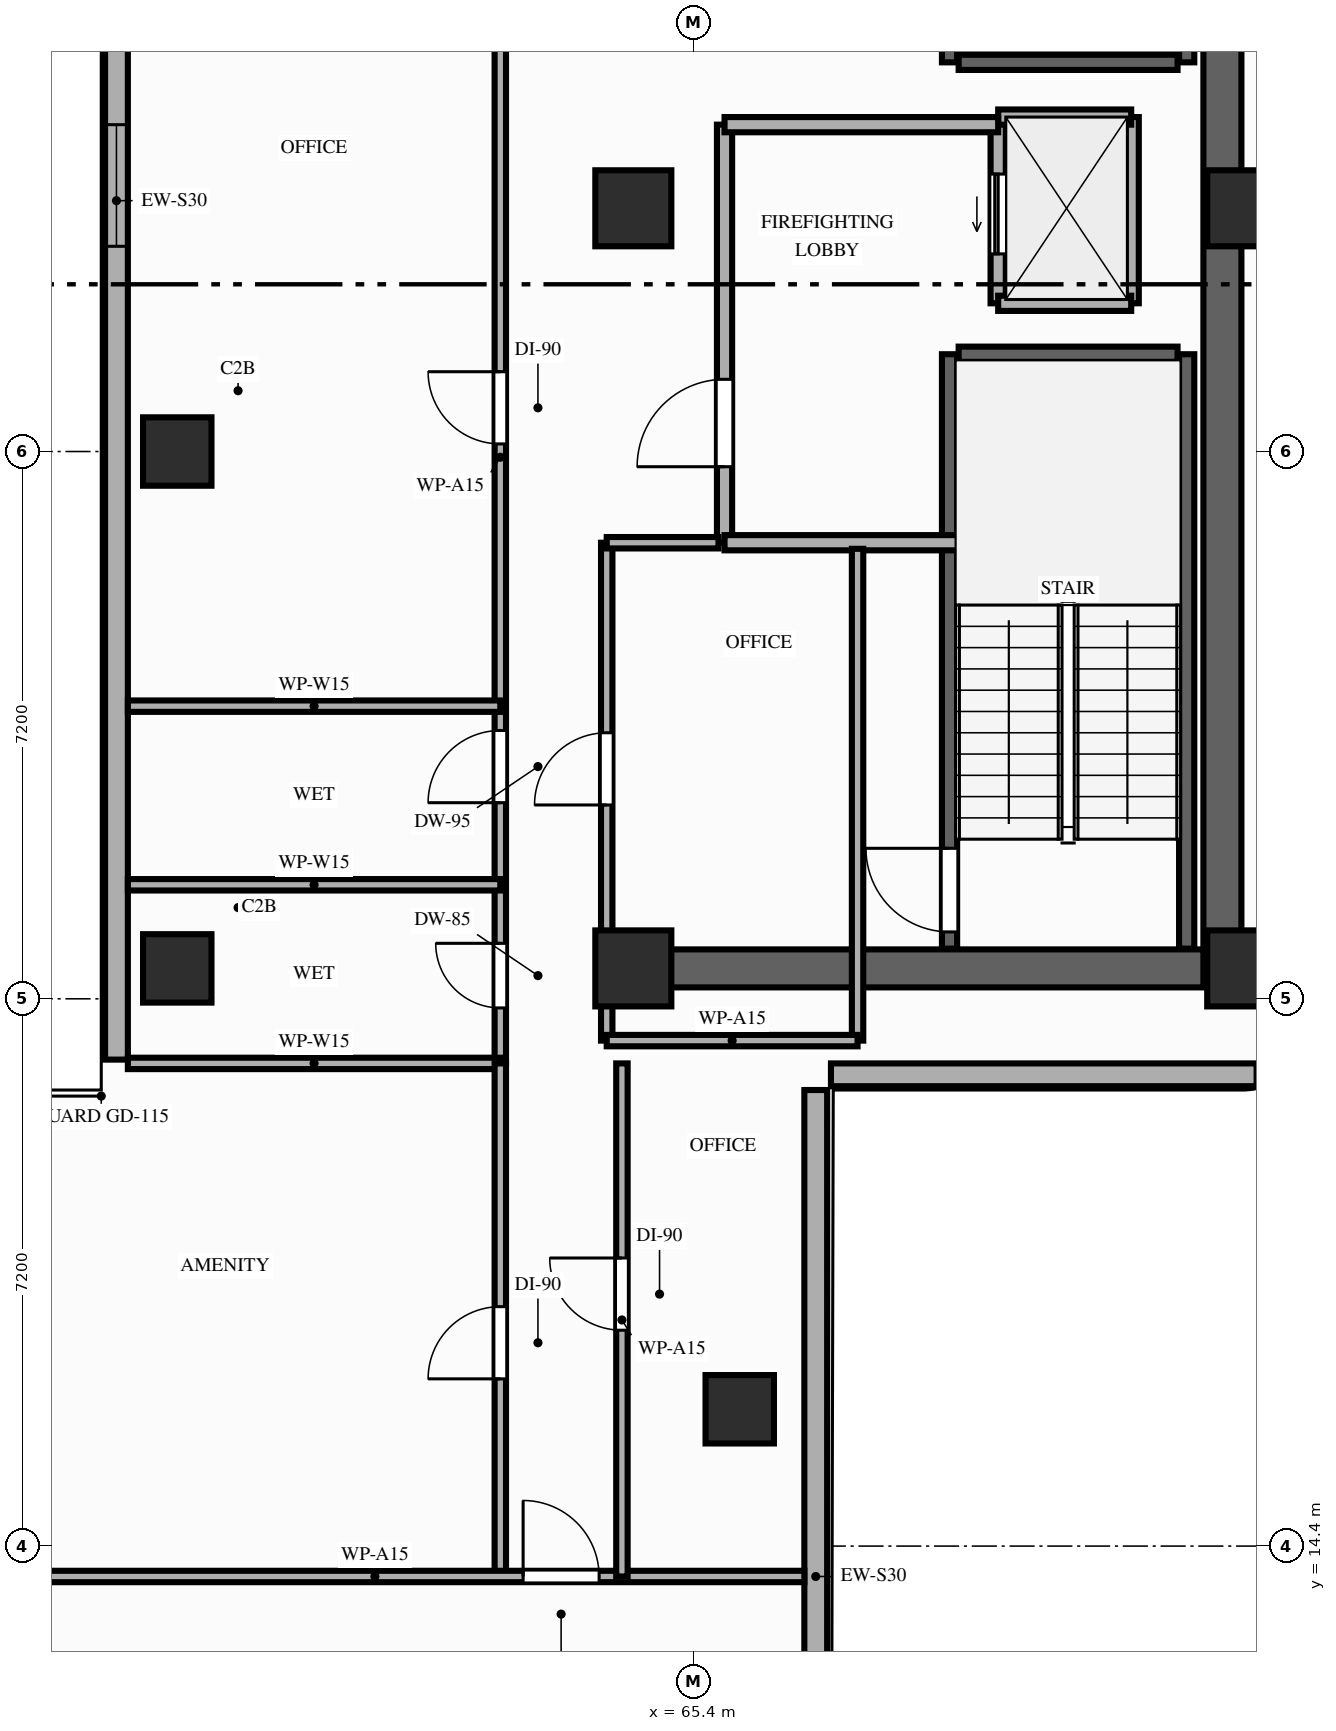
"""IFC4 building model, lengths in metres.
Left out: names, types, materials, properties, quantities, classifications, styles, units other than length and angle.
Written with IfcOpenShell. Run it as: python <this file> out.ifc"""

import sys

from ifc_helpers import new_model, si_unit, direction, frame, frame_2d, origin, origin_2d, place, context, subcontext, project, spatial, rectangle, extrude, element, fill, save


model = new_model("IFC4")
c1 = context("Model", 3, precision=1e-05, world=origin(), true_north=direction((0.0, 1.0)))
c2 = subcontext(c1, "Body", "Model", "MODEL_VIEW")
j1 = project(units=[si_unit("LENGTHUNIT", "METRE"), si_unit("PLANEANGLEUNIT", "RADIAN")], contexts=[c1])
p1 = place(None, origin())
s1 = spatial("IfcSite", under=j1, at=p1, CompositionType="ELEMENT")
p2 = place(p1, origin())
s2 = spatial("IfcBuilding", under=s1, at=p2, CompositionType="ELEMENT")
p3 = place(p2, frame((0.0, 0.0, 79.4)))
s3 = spatial("IfcBuildingStorey", under=s2, at=p3, CompositionType="ELEMENT", Elevation=79.4)
for number, where, z_axis, x_axis in (
    (1, (64.6, 22.0, 0.0), (0.0, 0.0, 1.0), (1.0, 0.0, 0.0)),
    (2, (72.65, 22.0, 0.0), (0.0, 0.0, 1.0), (1.0, 0.0, 0.0)),
    (3, (64.6, 32.0, 0.0), (0.0, 0.0, 1.0), (1.0, 0.0, 0.0)),
    (4, (72.65, 32.0, 0.0), (0.0, 0.0, 1.0), (1.0, 0.0, 0.0)),
):
    element("IfcColumn", number, at=place(p3, frame(where, z_axis=z_axis, x_axis=x_axis)), inside=s3, PredefinedType="COLUMN", context=c2, shape_type="SweptSolid", body=[
        extrude(rectangle(XDim=1.0, YDim=1.0, at=origin_2d()), origin(), (0.0, 0.0, 1.0), 4.0),
    ])
for number, where, z_axis, x_axis in (
    (5, (58.6, 22.0, 0.0), (0.0, 0.0, 1.0), (1.0, 0.0, 0.0)),
    (6, (58.6, 28.8, 0.0), (0.0, 0.0, 1.0), (1.0, 0.0, 0.0)),
    (7, (66.0, 16.2, 0.0), (0.0, 0.0, 1.0), (1.0, 0.0, 0.0)),
):
    element("IfcColumn", number, at=place(p3, frame(where, z_axis=z_axis, x_axis=x_axis)), inside=s3, PredefinedType="COLUMN", context=c2, shape_type="SweptSolid", body=[
        extrude(rectangle(XDim=0.9, YDim=0.9, at=origin_2d()), origin(), (0.0, 0.0, 1.0), 4.0),
    ])
p4 = place(p3, frame((57.8, 43.4, 0.0), z_axis=(0.0, 0.0, 1.0), x_axis=(0.0, -1.0, 0.0)))
e8 = element("IfcWall", 8, at=p4, inside=s3, PredefinedType="STANDARD", context=c2, shape_type="SweptSolid", body=[
    extrude(rectangle(XDim=22.6, YDim=0.3, at=frame_2d((11.3, 0.0))), origin(), (0.0, 0.0, 1.0), 3.4),
])
p5 = place(p4, frame((10.3, 0.0, 0.85)))
e9 = element("IfcOpeningElement", 9, at=p5, cuts=e8, PredefinedType="OPENING", context=c2, shape_type="SweptSolid", body=[
    extrude(rectangle(XDim=1.6, YDim=1.7, at=frame_2d((0.8, 0.85))), frame((0.0, 0.16, 0.0), z_axis=(0.0, -1.0, 0.0), x_axis=(1.0, 0.0, 0.0)), (0.0, 0.0, 1.0), 0.32),
])
p6 = place(p4, frame((3.6, 0.0, 0.85)))
e10 = element("IfcOpeningElement", 10, at=p6, cuts=e8, PredefinedType="OPENING", context=c2, shape_type="SweptSolid", body=[
    extrude(rectangle(XDim=1.6, YDim=1.7, at=frame_2d((0.8, 0.85))), frame((0.0, 0.16, 0.0), z_axis=(0.0, -1.0, 0.0), x_axis=(1.0, 0.0, 0.0)), (0.0, 0.0, 1.0), 0.32),
])
p7 = place(p3, frame((67.0, 7.6, 0.0), z_axis=(0.0, 0.0, 1.0), x_axis=(0.0, 1.0, 0.0)))
e11 = element("IfcWall", 11, at=p7, inside=s3, PredefinedType="STANDARD", context=c2, shape_type="SweptSolid", body=[
    extrude(rectangle(XDim=12.8, YDim=0.3, at=frame_2d((6.4, 0.0))), origin(), (0.0, 0.0, 1.0), 3.82),
])
p8 = place(p3, frame((67.2, 20.6, 0.0), z_axis=(0.0, 0.0, 1.0), x_axis=(1.0, 0.0, 0.0)))
e12 = element("IfcWall", 12, at=p8, inside=s3, PredefinedType="STANDARD", context=c2, shape_type="SweptSolid", body=[
    extrude(rectangle(XDim=5.6, YDim=0.3, at=frame_2d((2.8, 0.0))), origin(), (0.0, 0.0, 1.0), 3.82),
])
p9 = place(p3, frame((72.35, 22.0, 0.0), z_axis=(0.0, 0.0, 1.0), x_axis=(0.0, 1.0, 0.0)))
e13 = element("IfcWall", 13, at=p9, inside=s3, PredefinedType="SHEAR", context=c2, shape_type="SweptSolid", body=[
    extrude(rectangle(XDim=20.25, YDim=0.5, at=frame_2d((10.125, 0.0))), origin(), (0.0, 0.0, 1.0), 3.82),
])
p10 = place(p3, frame((64.6, 22.0, 0.0), z_axis=(0.0, 0.0, 1.0), x_axis=(1.0, 0.0, 0.0)))
e14 = element("IfcWall", 14, at=p10, inside=s3, PredefinedType="SHEAR", context=c2, shape_type="SweptSolid", body=[
    extrude(rectangle(XDim=7.5, YDim=0.5, at=frame_2d((3.75, 0.0))), origin(), (0.0, 0.0, 1.0), 3.82),
])
p11 = place(p3, frame((68.76, 22.26, 0.0), z_axis=(0.0, 0.0, 1.0), x_axis=(0.0, 1.0, 0.0)))
e15 = element("IfcWall", 15, at=p11, inside=s3, PredefinedType="SHEAR", context=c2, shape_type="SweptSolid", body=[
    extrude(rectangle(XDim=7.82, YDim=0.2, at=frame_2d((3.91, 0.0))), origin(), (0.0, 0.0, 1.0), 3.82),
])
p12 = place(p11, frame((0.22, 0.0, 0.0)))
e16 = element("IfcOpeningElement", 16, at=p12, cuts=e15, PredefinedType="OPENING", context=c2, shape_type="SweptSolid", body=[
    extrude(rectangle(XDim=1.1, YDim=2.15, at=frame_2d((0.55, 1.075))), frame((0.0, 0.11, 0.0), z_axis=(0.0, -1.0, 0.0), x_axis=(1.0, 0.0, 0.0)), (0.0, 0.0, 1.0), 0.22),
])
p13 = place(p3, frame((71.88, 22.26, 0.0), z_axis=(0.0, 0.0, 1.0), x_axis=(0.0, 1.0, 0.0)))
e17 = element("IfcWall", 17, at=p13, inside=s3, PredefinedType="SHEAR", context=c2, shape_type="SweptSolid", body=[
    extrude(rectangle(XDim=7.82, YDim=0.2, at=frame_2d((3.91, 0.0))), origin(), (0.0, 0.0, 1.0), 3.82),
])
p14 = place(p3, frame((68.88, 30.08, 0.0), z_axis=(0.0, 0.0, 1.0), x_axis=(1.0, 0.0, 0.0)))
e18 = element("IfcWall", 18, at=p14, inside=s3, PredefinedType="SHEAR", context=c2, shape_type="SweptSolid", body=[
    extrude(rectangle(XDim=2.88, YDim=0.2, at=frame_2d((1.44, 0.0))), origin(), (0.0, 0.0, 1.0), 3.82),
])
p15 = place(p3, frame((68.76, 33.92, 0.0), z_axis=(0.0, 0.0, 1.0), x_axis=(0.0, 1.0, 0.0)))
e19 = element("IfcWall", 19, at=p15, inside=s3, PredefinedType="SHEAR", context=c2, shape_type="SweptSolid", body=[
    extrude(rectangle(XDim=7.96, YDim=0.2, at=frame_2d((3.98, 0.0))), origin(), (0.0, 0.0, 1.0), 3.82),
])
p16 = place(p15, frame((0.22, 0.0, 0.0)))
e20 = element("IfcOpeningElement", 20, at=p16, cuts=e19, PredefinedType="OPENING", context=c2, shape_type="SweptSolid", body=[
    extrude(rectangle(XDim=1.1, YDim=2.15, at=frame_2d((0.55, 1.075))), frame((0.0, 0.11, 0.0), z_axis=(0.0, -1.0, 0.0), x_axis=(1.0, 0.0, 0.0)), (0.0, 0.0, 1.0), 0.22),
])
p17 = place(p3, frame((71.88, 33.92, 0.0), z_axis=(0.0, 0.0, 1.0), x_axis=(0.0, 1.0, 0.0)))
e21 = element("IfcWall", 21, at=p17, inside=s3, PredefinedType="SHEAR", context=c2, shape_type="SweptSolid", body=[
    extrude(rectangle(XDim=7.96, YDim=0.2, at=frame_2d((3.98, 0.0))), origin(), (0.0, 0.0, 1.0), 3.82),
])
p18 = place(p3, frame((68.88, 33.92, 0.0), z_axis=(0.0, 0.0, 1.0), x_axis=(1.0, 0.0, 0.0)))
e22 = element("IfcWall", 22, at=p18, inside=s3, PredefinedType="SHEAR", context=c2, shape_type="SweptSolid", body=[
    extrude(rectangle(XDim=2.88, YDim=0.2, at=frame_2d((1.44, 0.0))), origin(), (0.0, 0.0, 1.0), 3.82),
])
p19 = place(p3, frame((69.4, 30.75, 0.0), z_axis=(0.0, 0.0, 1.0), x_axis=(0.0, 1.0, 0.0)))
e23 = element("IfcWall", 23, at=p19, inside=s3, PredefinedType="MOVABLE", context=c2, shape_type="SweptSolid", body=[
    extrude(rectangle(XDim=2.45, YDim=0.2, at=frame_2d((1.225, 0.0))), origin(), (0.0, 0.0, 1.0), 3.82),
])
p20 = place(p19, frame((0.65, 0.0, 0.0)))
e24 = element("IfcOpeningElement", 24, at=p20, cuts=e23, PredefinedType="OPENING", context=c2, shape_type="SweptSolid", body=[
    extrude(rectangle(XDim=1.05, YDim=2.15, at=frame_2d((0.525, 1.075))), frame((0.0, 0.11, 0.0), z_axis=(0.0, -1.0, 0.0), x_axis=(1.0, 0.0, 0.0)), (0.0, 0.0, 1.0), 0.22),
])
p21 = place(p3, frame((71.15, 30.75, 0.0), z_axis=(0.0, 0.0, 1.0), x_axis=(0.0, 1.0, 0.0)))
e25 = element("IfcWall", 25, at=p21, inside=s3, PredefinedType="MOVABLE", context=c2, shape_type="SweptSolid", body=[
    extrude(rectangle(XDim=2.45, YDim=0.2, at=frame_2d((1.225, 0.0))), origin(), (0.0, 0.0, 1.0), 3.82),
])
for number, where, z_axis, x_axis in (
    (26, (69.4, 33.2, 0.0), (0.0, 0.0, 1.0), (1.0, 0.0, 0.0)),
    (27, (69.4, 30.75, 0.0), (0.0, 0.0, 1.0), (1.0, 0.0, 0.0)),
):
    element("IfcWall", number, at=place(p3, frame(where, z_axis=z_axis, x_axis=x_axis)), inside=s3, PredefinedType="MOVABLE", context=c2, shape_type="SweptSolid", body=[
        extrude(rectangle(XDim=1.75, YDim=0.2, at=frame_2d((0.875, 0.0))), origin(), (0.0, 0.0, 1.0), 3.82),
    ])
p22 = place(p3, frame((65.8, 27.6, 0.0), z_axis=(0.0, 0.0, 1.0), x_axis=(0.0, 1.0, 0.0)))
e28 = element("IfcWall", 28, at=p22, inside=s3, PredefinedType="PARTITIONING", context=c2, shape_type="SweptSolid", body=[
    extrude(rectangle(XDim=5.5, YDim=0.2, at=frame_2d((2.75, 0.0))), origin(), (0.0, 0.0, 1.0), 3.82),
])
p23 = place(p22, frame((1.0, 0.0, 0.0)))
e29 = element("IfcOpeningElement", 29, at=p23, cuts=e28, PredefinedType="OPENING", context=c2, shape_type="SweptSolid", body=[
    extrude(rectangle(XDim=1.15, YDim=2.15, at=frame_2d((0.575, 1.075))), frame((0.0, 0.11, 0.0), z_axis=(0.0, -1.0, 0.0), x_axis=(1.0, 0.0, 0.0)), (0.0, 0.0, 1.0), 0.22),
])
p24 = place(p3, frame((65.8, 33.1, 0.0), z_axis=(0.0, 0.0, 1.0), x_axis=(1.0, 0.0, 0.0)))
e30 = element("IfcWall", 30, at=p24, inside=s3, PredefinedType="PARTITIONING", context=c2, shape_type="SweptSolid", body=[
    extrude(rectangle(XDim=3.6, YDim=0.2, at=frame_2d((1.8, 0.0))), origin(), (0.0, 0.0, 1.0), 3.82),
])
p25 = place(p3, frame((65.8, 27.6, 0.0), z_axis=(0.0, 0.0, 1.0), x_axis=(1.0, 0.0, 0.0)))
e31 = element("IfcWall", 31, at=p25, inside=s3, PredefinedType="PARTITIONING", context=c2, shape_type="SweptSolid", body=[
    extrude(rectangle(XDim=3.4, YDim=0.2, at=frame_2d((1.7, 0.0))), origin(), (0.0, 0.0, 1.0), 3.82),
])
p26 = place(p3, frame((64.25, 21.05, 0.0), z_axis=(0.0, 0.0, 1.0), x_axis=(0.0, 1.0, 0.0)))
e32 = element("IfcWall", 32, at=p26, inside=s3, PredefinedType="PARTITIONING", context=c2, shape_type="SweptSolid", body=[
    extrude(rectangle(XDim=6.55, YDim=0.15, at=frame_2d((3.275, 0.0))), origin(), (0.0, 0.0, 1.0), 3.4),
])
p27 = place(p26, frame((3.1, 0.0, 0.0)))
e33 = element("IfcOpeningElement", 33, at=p27, cuts=e32, PredefinedType="OPENING", context=c2, shape_type="SweptSolid", body=[
    extrude(rectangle(XDim=0.95, YDim=2.15, at=frame_2d((0.475, 1.075))), frame((0.0, 0.085, 0.0), z_axis=(0.0, -1.0, 0.0), x_axis=(1.0, 0.0, 0.0)), (0.0, 0.0, 1.0), 0.17),
])
p28 = place(p3, frame((67.55, 21.05, 0.0), z_axis=(0.0, 0.0, 1.0), x_axis=(0.0, 1.0, 0.0)))
e34 = element("IfcWall", 34, at=p28, inside=s3, PredefinedType="PARTITIONING", context=c2, shape_type="SweptSolid", body=[
    extrude(rectangle(XDim=6.47, YDim=0.15, at=frame_2d((3.235, 0.0))), origin(), (0.0, 0.0, 1.0), 3.4),
])
p29 = place(p3, frame((64.25, 21.05, 0.0), z_axis=(0.0, 0.0, 1.0), x_axis=(1.0, 0.0, 0.0)))
e35 = element("IfcWall", 35, at=p29, inside=s3, PredefinedType="PARTITIONING", context=c2, shape_type="SweptSolid", body=[
    extrude(rectangle(XDim=3.3, YDim=0.15, at=frame_2d((1.65, 0.0))), origin(), (0.0, 0.0, 1.0), 3.4),
])
p30 = place(p3, frame((64.25, 27.6, 0.0), z_axis=(0.0, 0.0, 1.0), x_axis=(1.0, 0.0, 0.0)))
e36 = element("IfcWall", 36, at=p30, inside=s3, PredefinedType="PARTITIONING", context=c2, shape_type="SweptSolid", body=[
    extrude(rectangle(XDim=1.47, YDim=0.15, at=frame_2d((0.735, 0.0))), origin(), (0.0, 0.0, 1.0), 3.4),
])
p31 = place(p3, frame((62.85, 20.75, 0.0), z_axis=(0.0, 0.0, 1.0), x_axis=(0.0, 1.0, 0.0)))
e37 = element("IfcWall", 37, at=p31, inside=s3, PredefinedType="PARTITIONING", context=c2, shape_type="SweptSolid", body=[
    extrude(rectangle(XDim=22.7, YDim=0.15, at=frame_2d((11.35, 0.0))), origin(), (0.0, 0.0, 1.0), 3.4),
])
p32 = place(p31, frame((0.73, 0.0, 0.0)))
e38 = element("IfcOpeningElement", 38, at=p32, cuts=e37, PredefinedType="OPENING", context=c2, shape_type="SweptSolid", body=[
    extrude(rectangle(XDim=0.85, YDim=2.1, at=frame_2d((0.425, 1.05))), frame((0.0, 0.085, 0.0), z_axis=(0.0, -1.0, 0.0), x_axis=(1.0, 0.0, 0.0)), (0.0, 0.0, 1.0), 0.17),
])
p33 = place(p31, frame((3.43, 0.0, 0.0)))
e39 = element("IfcOpeningElement", 39, at=p33, cuts=e37, PredefinedType="OPENING", context=c2, shape_type="SweptSolid", body=[
    extrude(rectangle(XDim=0.95, YDim=2.1, at=frame_2d((0.475, 1.05))), frame((0.0, 0.085, 0.0), z_axis=(0.0, -1.0, 0.0), x_axis=(1.0, 0.0, 0.0)), (0.0, 0.0, 1.0), 0.17),
])
p34 = place(p31, frame((8.15, 0.0, 0.0)))
e40 = element("IfcOpeningElement", 40, at=p34, cuts=e37, PredefinedType="OPENING", context=c2, shape_type="SweptSolid", body=[
    extrude(rectangle(XDim=0.95, YDim=2.15, at=frame_2d((0.475, 1.075))), frame((0.0, 0.085, 0.0), z_axis=(0.0, -1.0, 0.0), x_axis=(1.0, 0.0, 0.0)), (0.0, 0.0, 1.0), 0.17),
])
for number, where, z_axis, x_axis in (
    (41, (57.95, 20.75, 0.0), (0.0, 0.0, 1.0), (1.0, 0.0, 0.0)),
    (42, (57.95, 23.1, 0.0), (0.0, 0.0, 1.0), (1.0, 0.0, 0.0)),
    (43, (57.95, 25.45, 0.0), (0.0, 0.0, 1.0), (1.0, 0.0, 0.0)),
):
    element("IfcWall", number, at=place(p3, frame(where, z_axis=z_axis, x_axis=x_axis)), inside=s3, PredefinedType="PARTITIONING", context=c2, shape_type="SweptSolid", body=[
        extrude(rectangle(XDim=4.9, YDim=0.15, at=frame_2d((2.45, 0.0))), origin(), (0.0, 0.0, 1.0), 3.4),
    ])
p35 = place(p3, frame((62.85, 14.0, 0.0), z_axis=(0.0, 0.0, 1.0), x_axis=(0.0, 1.0, 0.0)))
e44 = element("IfcWall", 44, at=p35, inside=s3, PredefinedType="PARTITIONING", context=c2, shape_type="SweptSolid", body=[
    extrude(rectangle(XDim=6.75, YDim=0.15, at=frame_2d((3.375, 0.0))), origin(), (0.0, 0.0, 1.0), 3.4),
])
p36 = place(p35, frame((2.6, 0.0, 0.0)))
e45 = element("IfcOpeningElement", 45, at=p36, cuts=e44, PredefinedType="OPENING", context=c2, shape_type="SweptSolid", body=[
    extrude(rectangle(XDim=0.95, YDim=2.15, at=frame_2d((0.475, 1.075))), frame((0.0, 0.085, 0.0), z_axis=(0.0, -1.0, 0.0), x_axis=(1.0, 0.0, 0.0)), (0.0, 0.0, 1.0), 0.17),
])
p37 = place(p3, frame((55.55, 14.0, 0.0), z_axis=(0.0, 0.0, 1.0), x_axis=(1.0, 0.0, 0.0)))
e46 = element("IfcWall", 46, at=p37, inside=s3, PredefinedType="PARTITIONING", context=c2, shape_type="SweptSolid", body=[
    extrude(rectangle(XDim=11.3, YDim=0.15, at=frame_2d((5.65, 0.0))), origin(), (0.0, 0.0, 1.0), 3.4),
])
p38 = place(p37, frame((7.6, 0.0, 0.0)))
e47 = element("IfcOpeningElement", 47, at=p38, cuts=e46, PredefinedType="OPENING", context=c2, shape_type="SweptSolid", body=[
    extrude(rectangle(XDim=1.0, YDim=2.15, at=frame_2d((0.5, 1.075))), frame((0.0, 0.085, 0.0), z_axis=(0.0, -1.0, 0.0), x_axis=(1.0, 0.0, 0.0)), (0.0, 0.0, 1.0), 0.17),
])
p39 = place(p3, frame((64.45, 14.0, 0.0), z_axis=(0.0, 0.0, 1.0), x_axis=(0.0, 1.0, 0.0)))
e48 = element("IfcWall", 48, at=p39, inside=s3, PredefinedType="PARTITIONING", context=c2, shape_type="SweptSolid", body=[
    extrude(rectangle(XDim=6.75, YDim=0.15, at=frame_2d((3.375, 0.0))), origin(), (0.0, 0.0, 1.0), 3.4),
])
p40 = place(p39, frame((3.24, 0.0, 0.0)))
e49 = element("IfcOpeningElement", 49, at=p40, cuts=e48, PredefinedType="OPENING", context=c2, shape_type="SweptSolid", body=[
    extrude(rectangle(XDim=0.95, YDim=2.15, at=frame_2d((0.475, 1.075))), frame((0.0, 0.085, 0.0), z_axis=(0.0, -1.0, 0.0), x_axis=(1.0, 0.0, 0.0)), (0.0, 0.0, 1.0), 0.17),
])
p41 = place(p5, origin())
e50 = element("IfcWindow", 50, at=p41, inside=s3, PartitioningType="SINGLE_PANEL", PredefinedType="WINDOW", context=c2, shape_type="SweptSolid", body=[
    extrude(rectangle(XDim=1.6, YDim=1.7, at=frame_2d((0.8, 0.85))), frame((0.0, 0.03, 0.0), z_axis=(0.0, -1.0, 0.0), x_axis=(1.0, 0.0, 0.0)), (0.0, 0.0, 1.0), 0.06),
])
fill(e9, e50)
p42 = place(p12, origin())
e51 = element("IfcDoor", 51, at=p42, inside=s3, OperationType="SINGLE_SWING_RIGHT", PredefinedType="DOOR", context=c2, shape_type="SweptSolid", body=[
    extrude(rectangle(XDim=1.1, YDim=2.15, at=frame_2d((0.55, 1.075))), frame((0.0, 0.025, 0.0), z_axis=(0.0, -1.0, 0.0), x_axis=(1.0, 0.0, 0.0)), (0.0, 0.0, 1.0), 0.05),
])
fill(e16, e51)
p43 = place(p20, origin())
e52 = element("IfcDoor", 52, at=p43, inside=s3, OperationType="SLIDING_TO_LEFT", PredefinedType="DOOR", context=c2, shape_type="SweptSolid", body=[
    extrude(rectangle(XDim=1.05, YDim=2.15, at=frame_2d((0.525, 1.075))), frame((0.0, 0.025, 0.0), z_axis=(0.0, -1.0, 0.0), x_axis=(1.0, 0.0, 0.0)), (0.0, 0.0, 1.0), 0.05),
])
fill(e24, e52)
p44 = place(p23, origin())
e53 = element("IfcDoor", 53, at=p44, inside=s3, OperationType="SINGLE_SWING_LEFT", PredefinedType="DOOR", context=c2, shape_type="SweptSolid", body=[
    extrude(rectangle(XDim=1.15, YDim=2.15, at=frame_2d((0.575, 1.075))), frame((0.0, 0.025, 0.0), z_axis=(0.0, -1.0, 0.0), x_axis=(1.0, 0.0, 0.0)), (0.0, 0.0, 1.0), 0.05),
])
fill(e29, e53)
p45 = place(p27, origin())
e54 = element("IfcDoor", 54, at=p45, inside=s3, OperationType="SINGLE_SWING_LEFT", PredefinedType="DOOR", context=c2, shape_type="SweptSolid", body=[
    extrude(rectangle(XDim=0.95, YDim=2.15, at=frame_2d((0.475, 1.075))), frame((0.0, 0.025, 0.0), z_axis=(0.0, -1.0, 0.0), x_axis=(1.0, 0.0, 0.0)), (0.0, 0.0, 1.0), 0.05),
])
fill(e33, e54)
p46 = place(p32, origin())
e55 = element("IfcDoor", 55, at=p46, inside=s3, OperationType="SINGLE_SWING_RIGHT", PredefinedType="DOOR", context=c2, shape_type="SweptSolid", body=[
    extrude(rectangle(XDim=0.85, YDim=2.1, at=frame_2d((0.425, 1.05))), frame((0.0, 0.025, 0.0), z_axis=(0.0, -1.0, 0.0), x_axis=(1.0, 0.0, 0.0)), (0.0, 0.0, 1.0), 0.05),
])
fill(e38, e55)
p47 = place(p33, origin())
e56 = element("IfcDoor", 56, at=p47, inside=s3, OperationType="SINGLE_SWING_LEFT", PredefinedType="DOOR", context=c2, shape_type="SweptSolid", body=[
    extrude(rectangle(XDim=0.95, YDim=2.1, at=frame_2d((0.475, 1.05))), frame((0.0, 0.025, 0.0), z_axis=(0.0, -1.0, 0.0), x_axis=(1.0, 0.0, 0.0)), (0.0, 0.0, 1.0), 0.05),
])
fill(e39, e56)
p48 = place(p34, origin())
e57 = element("IfcDoor", 57, at=p48, inside=s3, OperationType="SINGLE_SWING_RIGHT", PredefinedType="DOOR", context=c2, shape_type="SweptSolid", body=[
    extrude(rectangle(XDim=0.95, YDim=2.15, at=frame_2d((0.475, 1.075))), frame((0.0, 0.025, 0.0), z_axis=(0.0, -1.0, 0.0), x_axis=(1.0, 0.0, 0.0)), (0.0, 0.0, 1.0), 0.05),
])
fill(e40, e57)
p49 = place(p36, origin())
e58 = element("IfcDoor", 58, at=p49, inside=s3, OperationType="SINGLE_SWING_LEFT", PredefinedType="DOOR", context=c2, shape_type="SweptSolid", body=[
    extrude(rectangle(XDim=0.95, YDim=2.15, at=frame_2d((0.475, 1.075))), frame((0.0, 0.025, 0.0), z_axis=(0.0, -1.0, 0.0), x_axis=(1.0, 0.0, 0.0)), (0.0, 0.0, 1.0), 0.05),
])
fill(e45, e58)
p50 = place(p40, origin())
e59 = element("IfcDoor", 59, at=p50, inside=s3, OperationType="SINGLE_SWING_RIGHT", PredefinedType="DOOR", context=c2, shape_type="SweptSolid", body=[
    extrude(rectangle(XDim=0.95, YDim=2.15, at=frame_2d((0.475, 1.075))), frame((0.0, 0.025, 0.0), z_axis=(0.0, -1.0, 0.0), x_axis=(1.0, 0.0, 0.0)), (0.0, 0.0, 1.0), 0.05),
])
fill(e49, e59)
p51 = place(p38, origin())
e60 = element("IfcDoor", 60, at=p51, inside=s3, OperationType="SINGLE_SWING_LEFT", PredefinedType="DOOR", context=c2, shape_type="SweptSolid", body=[
    extrude(rectangle(XDim=1.0, YDim=2.15, at=frame_2d((0.5, 1.075))), frame((0.0, 0.025, 0.0), z_axis=(0.0, -1.0, 0.0), x_axis=(1.0, 0.0, 0.0)), (0.0, 0.0, 1.0), 0.05),
])
fill(e47, e60)
save(model, sys.argv[1])
